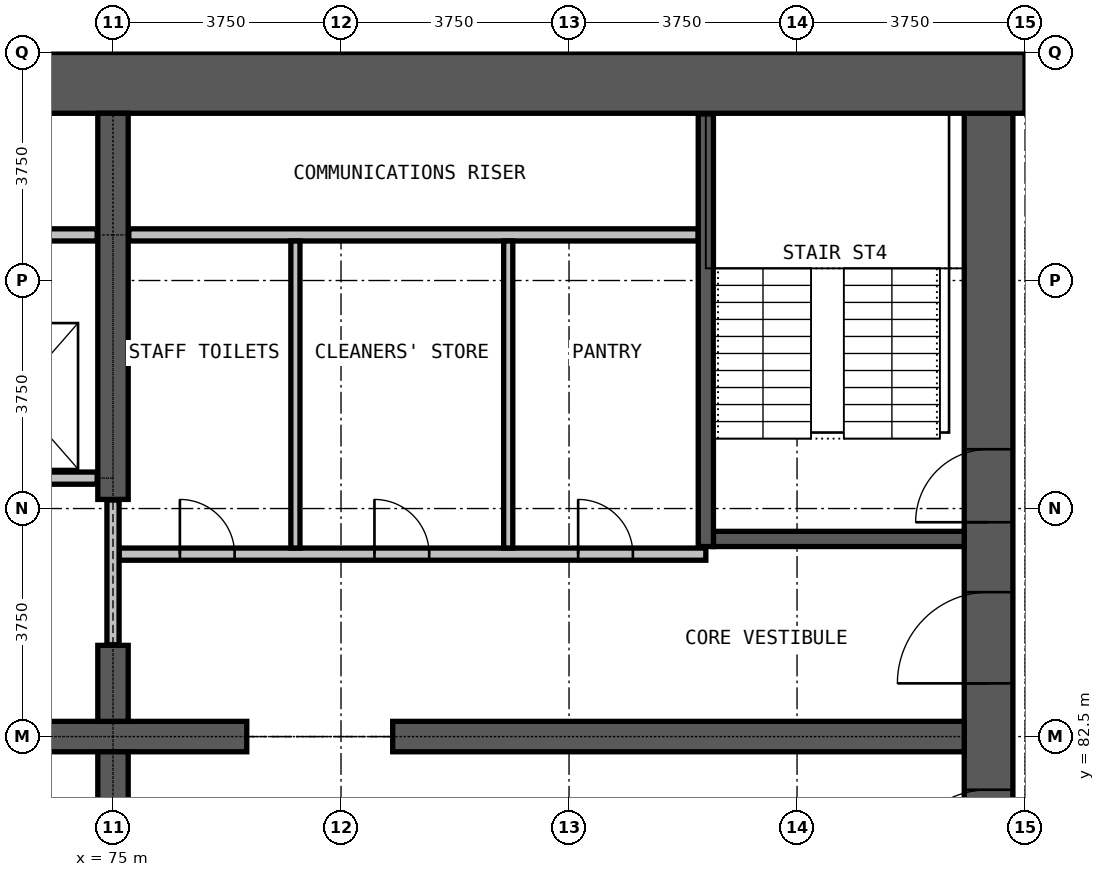
"""IFC4 building model, lengths in metres.
Left out: names, types, materials, properties, quantities, classifications, styles, units other than length and angle.
Written with IfcOpenShell. Run it as: python <this file> out.ifc"""

import sys

from ifc_helpers import new_model, si_unit, direction, frame, frame_2d, origin, place, context, subcontext, project, spatial, rectangle, extrude, element, fill, save


model = new_model("IFC4")
c1 = context("Model", 3, precision=1e-05, world=origin(), true_north=direction((0.0, 1.0)))
c2 = subcontext(c1, "Body", "Model", "MODEL_VIEW")
j1 = project(units=[si_unit("LENGTHUNIT", "METRE"), si_unit("PLANEANGLEUNIT", "RADIAN")], contexts=[c1])
p1 = place(None, origin())
s1 = spatial("IfcSite", under=j1, at=p1, CompositionType="ELEMENT")
p2 = place(p1, origin())
s2 = spatial("IfcBuilding", under=s1, at=p2, CompositionType="ELEMENT")
p3 = place(p2, frame((0.0, 0.0, 110.8)))
s3 = spatial("IfcBuildingStorey", under=s2, at=p3, CompositionType="ELEMENT", Elevation=110.8)
p4 = place(p3, frame((89.4, 72.25, 0.0), z_axis=(0.0, 0.0, 1.0), x_axis=(0.0, 1.0, 0.0)))
e1 = element("IfcWall", 1, at=p4, inside=s3, PredefinedType="SHEAR", context=c2, shape_type="SweptSolid", body=[
    extrude(rectangle(XDim=20.5, YDim=0.8, at=frame_2d((10.25, 0.0))), origin(), (0.0, 0.0, 1.0), 3.6),
])
p5 = place(p4, frame((0.275, 0.0, 0.0)))
e2 = element("IfcOpeningElement", 2, at=p5, cuts=e1, PredefinedType="OPENING", context=c2, shape_type="SweptSolid", body=[
    extrude(rectangle(XDim=1.2, YDim=2.2, at=frame_2d((0.6, 1.1))), frame((0.0, 0.41, 0.0), z_axis=(0.0, -1.0, 0.0), x_axis=(1.0, 0.0, 0.0)), (0.0, 0.0, 1.0), 0.82),
])
p6 = place(p4, frame((13.775, 0.0, 0.0)))
e3 = element("IfcOpeningElement", 3, at=p6, cuts=e1, PredefinedType="OPENING", context=c2, shape_type="SweptSolid", body=[
    extrude(rectangle(XDim=1.2, YDim=2.2, at=frame_2d((0.6, 1.1))), frame((0.0, 0.41, 0.0), z_axis=(0.0, -1.0, 0.0), x_axis=(1.0, 0.0, 0.0)), (0.0, 0.0, 1.0), 0.82),
])
p7 = place(p4, frame((7.875, 0.0, 0.0)))
e4 = element("IfcOpeningElement", 4, at=p7, cuts=e1, PredefinedType="OPENING", context=c2, shape_type="SweptSolid", body=[
    extrude(rectangle(XDim=1.5, YDim=2.2, at=frame_2d((0.75, 1.1))), frame((0.0, 0.41, 0.0), z_axis=(0.0, -1.0, 0.0), x_axis=(1.0, 0.0, 0.0)), (0.0, 0.0, 1.0), 0.82),
])
p8 = place(p4, frame((11.125, 0.0, 0.0)))
e5 = element("IfcOpeningElement", 5, at=p8, cuts=e1, PredefinedType="OPENING", context=c2, shape_type="SweptSolid", body=[
    extrude(rectangle(XDim=1.5, YDim=2.2, at=frame_2d((0.75, 1.1))), frame((0.0, 0.41, 0.0), z_axis=(0.0, -1.0, 0.0), x_axis=(1.0, 0.0, 0.0)), (0.0, 0.0, 1.0), 0.82),
])
p9 = place(p3, frame((90.0, 93.25, 0.0), z_axis=(0.0, 0.0, 1.0), x_axis=(-1.0, 0.0, 0.0)))
e6 = element("IfcWall", 6, at=p9, inside=s3, PredefinedType="SHEAR", context=c2, shape_type="SweptSolid", body=[
    extrude(rectangle(XDim=30.0, YDim=1.0, at=frame_2d((15.0, 0.0))), origin(), (0.0, 0.0, 1.0), 3.6),
])
p10 = place(p3, frame((72.8, 82.5, 0.0), z_axis=(0.0, 0.0, 1.0), x_axis=(1.0, 0.0, 0.0)))
e7 = element("IfcWall", 7, at=p10, inside=s3, PredefinedType="SHEAR", context=c2, shape_type="SweptSolid", body=[
    extrude(rectangle(XDim=4.4, YDim=0.5, at=frame_2d((2.2, 0.0))), origin(), (0.0, 0.0, 1.0), 3.6),
])
p11 = place(p3, frame((79.6, 82.5, 0.0), z_axis=(0.0, 0.0, 1.0), x_axis=(1.0, 0.0, 0.0)))
e8 = element("IfcWall", 8, at=p11, inside=s3, PredefinedType="SHEAR", context=c2, shape_type="SweptSolid", body=[
    extrude(rectangle(XDim=9.4, YDim=0.5, at=frame_2d((4.7, 0.0))), origin(), (0.0, 0.0, 1.0), 3.6),
])
for number, where, z_axis, x_axis in (
    (9, (75.0, 81.0, 0.0), (0.0, 0.0, 1.0), (0.0, 1.0, 0.0)),
    (10, (75.0, 82.75, 0.0), (0.0, 0.0, 1.0), (0.0, 1.0, 0.0)),
):
    element("IfcWall", number, at=place(p3, frame(where, z_axis=z_axis, x_axis=x_axis)), inside=s3, PredefinedType="SHEAR", context=c2, shape_type="SweptSolid", body=[
        extrude(rectangle(XDim=1.25, YDim=0.5, at=frame_2d((0.625, 0.0))), origin(), (0.0, 0.0, 1.0), 3.6),
    ])
p12 = place(p3, frame((75.0, 86.4, 0.0), z_axis=(0.0, 0.0, 1.0), x_axis=(0.0, 1.0, 0.0)))
e11 = element("IfcWall", 11, at=p12, inside=s3, PredefinedType="SHEAR", context=c2, shape_type="SweptSolid", body=[
    extrude(rectangle(XDim=6.35, YDim=0.5, at=frame_2d((3.175, 0.0))), origin(), (0.0, 0.0, 1.0), 3.6),
])
p13 = place(p3, frame((75.1, 85.5, 0.0), z_axis=(0.0, 0.0, 1.0), x_axis=(1.0, 0.0, 0.0)))
e12 = element("IfcWall", 12, at=p13, inside=s3, PredefinedType="PARTITIONING", context=c2, shape_type="SweptSolid", body=[
    extrude(rectangle(XDim=9.65, YDim=0.2, at=frame_2d((4.825, 0.0))), origin(), (0.0, 0.0, 1.0), 3.3),
])
p14 = place(p13, frame((1.0, 0.0, 0.0)))
e13 = element("IfcOpeningElement", 13, at=p14, cuts=e12, PredefinedType="OPENING", context=c2, shape_type="SweptSolid", body=[
    extrude(rectangle(XDim=0.9, YDim=2.2, at=frame_2d((0.45, 1.1))), frame((0.0, 0.11, 0.0), z_axis=(0.0, -1.0, 0.0), x_axis=(1.0, 0.0, 0.0)), (0.0, 0.0, 1.0), 0.22),
])
p15 = place(p13, frame((4.2, 0.0, 0.0)))
e14 = element("IfcOpeningElement", 14, at=p15, cuts=e12, PredefinedType="OPENING", context=c2, shape_type="SweptSolid", body=[
    extrude(rectangle(XDim=0.9, YDim=2.2, at=frame_2d((0.45, 1.1))), frame((0.0, 0.11, 0.0), z_axis=(0.0, -1.0, 0.0), x_axis=(1.0, 0.0, 0.0)), (0.0, 0.0, 1.0), 0.22),
])
p16 = place(p13, frame((7.55, 0.0, 0.0)))
e15 = element("IfcOpeningElement", 15, at=p16, cuts=e12, PredefinedType="OPENING", context=c2, shape_type="SweptSolid", body=[
    extrude(rectangle(XDim=0.9, YDim=2.2, at=frame_2d((0.45, 1.1))), frame((0.0, 0.11, 0.0), z_axis=(0.0, -1.0, 0.0), x_axis=(1.0, 0.0, 0.0)), (0.0, 0.0, 1.0), 0.22),
])
p17 = place(p3, frame((75.26, 90.75, 0.0), z_axis=(0.0, 0.0, 1.0), x_axis=(1.0, 0.0, 0.0)))
e16 = element("IfcWall", 16, at=p17, inside=s3, PredefinedType="PARTITIONING", context=c2, shape_type="SweptSolid", body=[
    extrude(rectangle(XDim=9.365, YDim=0.2, at=frame_2d((4.683, 0.0))), origin(), (0.0, 0.0, 1.0), 3.3),
])
p18 = place(p3, frame((75.0, 84.01, 0.0), z_axis=(0.0, 0.0, 1.0), x_axis=(0.0, 1.0, 0.0)))
e17 = element("IfcWall", 17, at=p18, inside=s3, PredefinedType="PARTITIONING", context=c2, shape_type="SweptSolid", body=[
    extrude(rectangle(XDim=2.38, YDim=0.2, at=frame_2d((1.19, 0.0))), origin(), (0.0, 0.0, 1.0), 2.4),
])
for number, where, z_axis, x_axis in (
    (18, (78.0, 85.6, 0.0), (0.0, 0.0, 1.0), (0.0, 1.0, 0.0)),
    (19, (81.5, 85.6, 0.0), (0.0, 0.0, 1.0), (0.0, 1.0, 0.0)),
):
    element("IfcWall", number, at=place(p3, frame(where, z_axis=z_axis, x_axis=x_axis)), inside=s3, PredefinedType="PARTITIONING", context=c2, shape_type="SweptSolid", body=[
        extrude(rectangle(XDim=5.05, YDim=0.15, at=frame_2d((2.525, 0.0))), origin(), (0.0, 0.0, 1.0), 3.3),
    ])
p19 = place(p3, frame((65.375, 86.75, 0.0), z_axis=(0.0, 0.0, 1.0), x_axis=(1.0, 0.0, 0.0)))
e20 = element("IfcWall", 20, at=p19, inside=s3, PredefinedType="PARTITIONING", context=c2, shape_type="SweptSolid", body=[
    extrude(rectangle(XDim=9.365, YDim=0.2, at=frame_2d((4.683, 0.0))), origin(), (0.0, 0.0, 1.0), 3.3),
])
p20 = place(p19, frame((1.0, 0.0, 0.0)))
e21 = element("IfcOpeningElement", 21, at=p20, cuts=e20, PredefinedType="OPENING", context=c2, shape_type="SweptSolid", body=[
    extrude(rectangle(XDim=1.1, YDim=2.2, at=frame_2d((0.55, 1.1))), frame((0.0, 0.11, 0.0), z_axis=(0.0, -1.0, 0.0), x_axis=(1.0, 0.0, 0.0)), (0.0, 0.0, 1.0), 0.22),
])
p21 = place(p19, frame((4.175, 0.0, 0.0)))
e22 = element("IfcOpeningElement", 22, at=p21, cuts=e20, PredefinedType="OPENING", context=c2, shape_type="SweptSolid", body=[
    extrude(rectangle(XDim=1.1, YDim=2.2, at=frame_2d((0.55, 1.1))), frame((0.0, 0.11, 0.0), z_axis=(0.0, -1.0, 0.0), x_axis=(1.0, 0.0, 0.0)), (0.0, 0.0, 1.0), 0.22),
])
p22 = place(p19, frame((7.325, 0.0, 0.0)))
e23 = element("IfcOpeningElement", 23, at=p22, cuts=e20, PredefinedType="OPENING", context=c2, shape_type="SweptSolid", body=[
    extrude(rectangle(XDim=1.1, YDim=2.2, at=frame_2d((0.55, 1.1))), frame((0.0, 0.11, 0.0), z_axis=(0.0, -1.0, 0.0), x_axis=(1.0, 0.0, 0.0)), (0.0, 0.0, 1.0), 0.22),
])
p23 = place(p3, frame((65.375, 90.75, 0.0), z_axis=(0.0, 0.0, 1.0), x_axis=(1.0, 0.0, 0.0)))
e24 = element("IfcWall", 24, at=p23, inside=s3, PredefinedType="PARTITIONING", context=c2, shape_type="SweptSolid", body=[
    extrude(rectangle(XDim=9.365, YDim=0.2, at=frame_2d((4.683, 0.0))), origin(), (0.0, 0.0, 1.0), 3.3),
])
p24 = place(p3, frame((84.875, 85.75, 0.0), z_axis=(0.0, 0.0, 1.0), x_axis=(1.0, 0.0, 0.0)))
e25 = element("IfcWall", 25, at=p24, inside=s3, PredefinedType="PARTITIONING", context=c2, shape_type="SweptSolid", body=[
    extrude(rectangle(XDim=4.125, YDim=0.25, at=frame_2d((2.062, 0.0))), origin(), (0.0, 0.0, 1.0), 3.3),
])
p25 = place(p3, frame((84.75, 85.625, 0.0), z_axis=(0.0, 0.0, 1.0), x_axis=(0.0, 1.0, 0.0)))
e26 = element("IfcWall", 26, at=p25, inside=s3, PredefinedType="PARTITIONING", context=c2, shape_type="SweptSolid", body=[
    extrude(rectangle(XDim=7.115, YDim=0.25, at=frame_2d((3.558, 0.0))), origin(), (0.0, 0.0, 1.0), 3.3),
])
p26 = place(p6, origin())
e27 = element("IfcDoor", 27, at=p26, inside=s3, OperationType="SINGLE_SWING_LEFT", PredefinedType="DOOR", context=c2, shape_type="SweptSolid", body=[
    extrude(rectangle(XDim=1.2, YDim=2.2, at=frame_2d((0.6, 1.1))), frame((0.0, 0.025, 0.0), z_axis=(0.0, -1.0, 0.0), x_axis=(1.0, 0.0, 0.0)), (0.0, 0.0, 1.0), 0.05),
])
fill(e3, e27)
p27 = place(p7, origin())
e28 = element("IfcDoor", 28, at=p27, inside=s3, OperationType="DOUBLE_DOOR_SINGLE_SWING", PredefinedType="DOOR", context=c2, shape_type="SweptSolid", body=[
    extrude(rectangle(XDim=1.5, YDim=2.2, at=frame_2d((0.75, 1.1))), frame((0.0, 0.025, 0.0), z_axis=(0.0, -1.0, 0.0), x_axis=(1.0, 0.0, 0.0)), (0.0, 0.0, 1.0), 0.05),
])
fill(e4, e28)
p28 = place(p8, origin())
e29 = element("IfcDoor", 29, at=p28, inside=s3, OperationType="DOUBLE_DOOR_SINGLE_SWING", PredefinedType="DOOR", context=c2, shape_type="SweptSolid", body=[
    extrude(rectangle(XDim=1.5, YDim=2.2, at=frame_2d((0.75, 1.1))), frame((0.0, 0.025, 0.0), z_axis=(0.0, -1.0, 0.0), x_axis=(1.0, 0.0, 0.0)), (0.0, 0.0, 1.0), 0.05),
])
fill(e5, e29)
p29 = place(p14, origin())
e30 = element("IfcDoor", 30, at=p29, inside=s3, OperationType="SINGLE_SWING_RIGHT", PredefinedType="DOOR", context=c2, shape_type="SweptSolid", body=[
    extrude(rectangle(XDim=0.9, YDim=2.2, at=frame_2d((0.45, 1.1))), frame((0.0, 0.025, 0.0), z_axis=(0.0, -1.0, 0.0), x_axis=(1.0, 0.0, 0.0)), (0.0, 0.0, 1.0), 0.05),
])
fill(e13, e30)
p30 = place(p15, origin())
e31 = element("IfcDoor", 31, at=p30, inside=s3, OperationType="SINGLE_SWING_LEFT", PredefinedType="DOOR", context=c2, shape_type="SweptSolid", body=[
    extrude(rectangle(XDim=0.9, YDim=2.2, at=frame_2d((0.45, 1.1))), frame((0.0, 0.025, 0.0), z_axis=(0.0, -1.0, 0.0), x_axis=(1.0, 0.0, 0.0)), (0.0, 0.0, 1.0), 0.05),
])
fill(e14, e31)
p31 = place(p16, origin())
e32 = element("IfcDoor", 32, at=p31, inside=s3, OperationType="SINGLE_SWING_LEFT", PredefinedType="DOOR", context=c2, shape_type="SweptSolid", body=[
    extrude(rectangle(XDim=0.9, YDim=2.2, at=frame_2d((0.45, 1.1))), frame((0.0, 0.025, 0.0), z_axis=(0.0, -1.0, 0.0), x_axis=(1.0, 0.0, 0.0)), (0.0, 0.0, 1.0), 0.05),
])
fill(e15, e32)
save(model, sys.argv[1])
